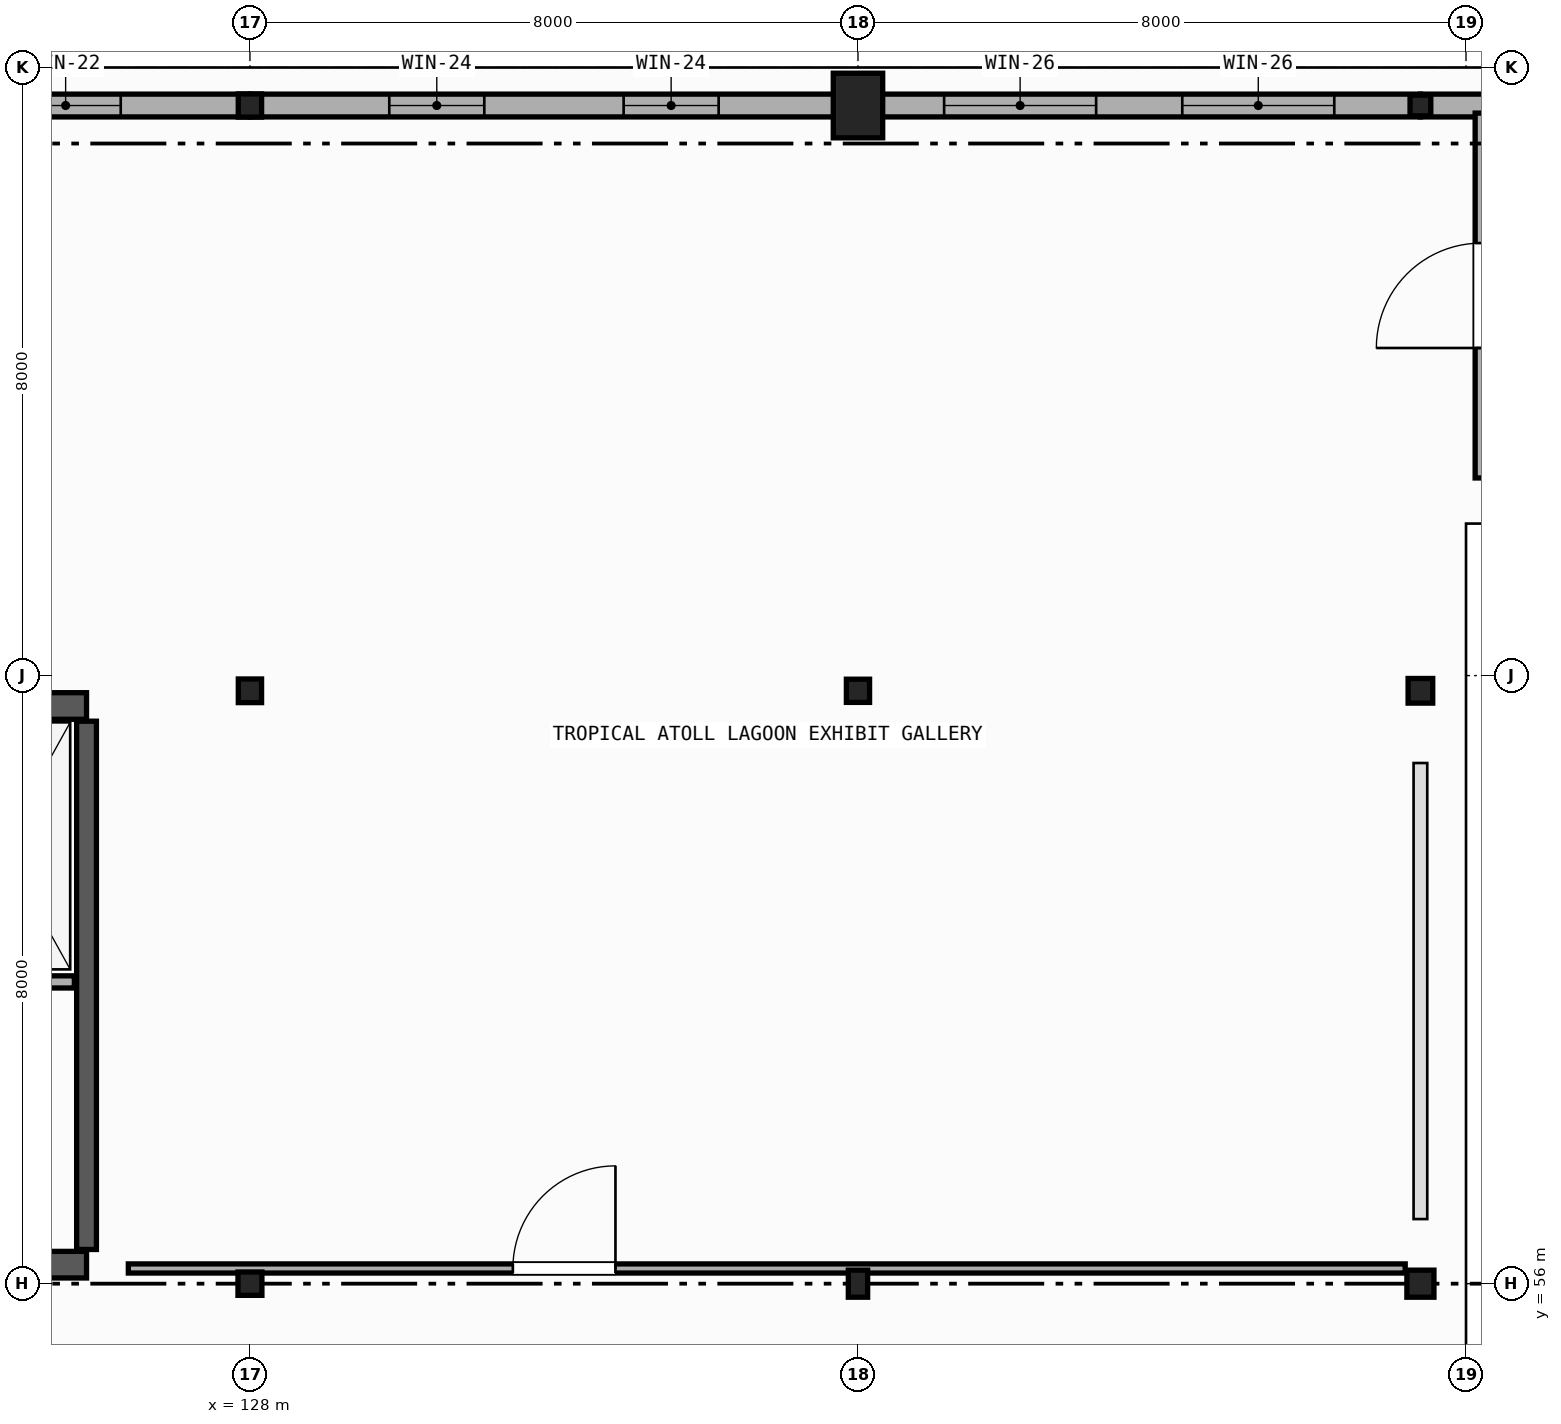
"""IFC4 building model, lengths in metres.
Left out: names, types, materials, properties, quantities, classifications, styles, units other than length and angle.
Written with IfcOpenShell. Run it as: python <this file> out.ifc"""

import sys

from ifc_helpers import new_model, si_unit, direction, frame, frame_2d, origin, origin_2d, place, context, subcontext, project, spatial, rectangle, hollow_rectangle, hollow_circle, i_section, extrude, element, fill, save


model = new_model("IFC4")
c1 = context("Model", 3, precision=1e-05, world=origin(), true_north=direction((0.0, 1.0)))
c2 = subcontext(c1, "Body", "Model", "MODEL_VIEW")
j1 = project(units=[si_unit("LENGTHUNIT", "METRE"), si_unit("PLANEANGLEUNIT", "RADIAN")], contexts=[c1])
p1 = place(None, origin())
s1 = spatial("IfcSite", under=j1, at=p1, CompositionType="ELEMENT")
p2 = place(p1, origin())
s2 = spatial("IfcBuilding", under=s1, at=p2, CompositionType="ELEMENT")
p3 = place(p2, origin())
s3 = spatial("IfcBuildingStorey", under=s2, at=p3, CompositionType="ELEMENT", Elevation=0.0)
p4 = place(p3, frame((128.0, 56.0, 0.0), z_axis=(0.0, 0.0, 1.0), x_axis=(0.0, 1.0, 0.0)))
e1 = element("IfcColumn", 1, at=p4, inside=s3, PredefinedType="COLUMN", context=c2, shape_type="SweptSolid", body=[
    extrude(i_section(OverallWidth=0.307, OverallDepth=0.315, WebThickness=0.012, FlangeThickness=0.019, FilletRadius=0.013, at=origin_2d()), origin(), (0.0, 0.0, 1.0), 5.12),
])
p5 = place(p3, frame((128.0, 63.8, 0.0), z_axis=(0.0, 0.0, 1.0), x_axis=(1.0, 0.0, 0.0)))
e2 = element("IfcColumn", 2, at=p5, inside=s3, PredefinedType="COLUMN", context=c2, shape_type="SweptSolid", body=[
    extrude(i_section(OverallWidth=0.306, OverallDepth=0.311, WebThickness=0.011, FlangeThickness=0.017, FilletRadius=0.013, at=origin_2d()), origin(), (0.0, 0.0, 1.0), 5.12),
])
p6 = place(p3, frame((128.0, 71.5, 0.0), z_axis=(0.0, 0.0, 1.0), x_axis=(0.0, 1.0, 0.0)))
e3 = element("IfcColumn", 3, at=p6, inside=s3, PredefinedType="COLUMN", context=c2, shape_type="SweptSolid", body=[
    extrude(i_section(OverallWidth=0.305, OverallDepth=0.307, WebThickness=0.01, FlangeThickness=0.015, FilletRadius=0.013, at=origin_2d()), origin(), (0.0, 0.0, 1.0), 5.12),
])
p7 = place(p3, frame((136.0, 56.0, 0.0), z_axis=(0.0, 0.0, 1.0), x_axis=(1.0, 0.0, 0.0)))
e4 = element("IfcColumn", 4, at=p7, inside=s3, PredefinedType="COLUMN", context=c2, shape_type="SweptSolid", body=[
    extrude(hollow_rectangle(XDim=0.254, YDim=0.356, WallThickness=0.012, InnerFilletRadius=0.012, OuterFilletRadius=0.024, at=origin_2d()), origin(), (0.0, 0.0, 1.0), 5.12),
])
p8 = place(p3, frame((136.0, 63.8, 0.0), z_axis=(0.0, 0.0, 1.0), x_axis=(0.0, 1.0, 0.0)))
e5 = element("IfcColumn", 5, at=p8, inside=s3, PredefinedType="COLUMN", context=c2, shape_type="SweptSolid", body=[
    extrude(hollow_rectangle(XDim=0.305, YDim=0.305, WallThickness=0.012, InnerFilletRadius=0.012, OuterFilletRadius=0.024, at=origin_2d()), origin(), (0.0, 0.0, 1.0), 5.12),
])
p9 = place(p3, frame((136.0, 71.5, 0.0), z_axis=(0.0, 0.0, 1.0), x_axis=(1.0, 0.0, 0.0)))
e6 = element("IfcColumn", 6, at=p9, inside=s3, PredefinedType="PILASTER", context=c2, shape_type="SweptSolid", body=[
    extrude(rectangle(XDim=0.65, YDim=0.85, at=origin_2d()), origin(), (0.0, 0.0, 1.0), 5.12),
])
p10 = place(p3, frame((143.4, 56.0, 0.0), z_axis=(0.0, 0.0, 1.0), x_axis=(0.0, 1.0, 0.0)))
e7 = element("IfcColumn", 7, at=p10, inside=s3, PredefinedType="COLUMN", context=c2, shape_type="SweptSolid", body=[
    extrude(hollow_circle(Radius=0.178, WallThickness=0.012, at=origin_2d()), origin(), (0.0, 0.0, 1.0), 5.12),
])
p11 = place(p3, frame((143.4, 63.8, 0.0), z_axis=(0.0, 0.0, 1.0), x_axis=(1.0, 0.0, 0.0)))
e8 = element("IfcColumn", 8, at=p11, inside=s3, PredefinedType="COLUMN", context=c2, shape_type="SweptSolid", body=[
    extrude(hollow_circle(Radius=0.162, WallThickness=0.012, at=origin_2d()), origin(), (0.0, 0.0, 1.0), 5.12),
])
p12 = place(p3, frame((143.4, 71.5, 0.0), z_axis=(0.0, 0.0, 1.0), x_axis=(0.0, 1.0, 0.0)))
e9 = element("IfcColumn", 9, at=p12, inside=s3, PredefinedType="COLUMN", context=c2, shape_type="SweptSolid", body=[
    extrude(hollow_circle(Radius=0.136, WallThickness=0.012, at=origin_2d()), origin(), (0.0, 0.0, 1.0), 5.12),
])
p13 = place(p3, frame((120.0, 71.5, 0.0), z_axis=(0.0, 0.0, 1.0), x_axis=(1.0, 0.0, 0.0)))
e10 = element("IfcWall", 10, at=p13, inside=s3, PredefinedType="STANDARD", context=c2, shape_type="SweptSolid", body=[
    extrude(rectangle(XDim=8.0, YDim=0.3, at=frame_2d((4.0, 0.0))), origin(), (0.0, 0.0, 1.0), 4.28),
])
p14 = place(p13, frame((1.7, 0.0, 0.95)))
e11 = element("IfcOpeningElement", 11, at=p14, cuts=e10, PredefinedType="OPENING", context=c2, shape_type="SweptSolid", body=[
    extrude(rectangle(XDim=1.45, YDim=2.05, at=frame_2d((0.725, 1.025))), frame((0.0, 0.16, 0.0), z_axis=(0.0, -1.0, 0.0), x_axis=(1.0, 0.0, 0.0)), (0.0, 0.0, 1.0), 0.32),
])
p15 = place(p13, frame((4.85, 0.0, 0.95)))
e12 = element("IfcOpeningElement", 12, at=p15, cuts=e10, PredefinedType="OPENING", context=c2, shape_type="SweptSolid", body=[
    extrude(rectangle(XDim=1.45, YDim=2.05, at=frame_2d((0.725, 1.025))), frame((0.0, 0.16, 0.0), z_axis=(0.0, -1.0, 0.0), x_axis=(1.0, 0.0, 0.0)), (0.0, 0.0, 1.0), 0.32),
])
p16 = place(p3, frame((128.0, 71.5, 0.0), z_axis=(0.0, 0.0, 1.0), x_axis=(1.0, 0.0, 0.0)))
e13 = element("IfcWall", 13, at=p16, inside=s3, PredefinedType="STANDARD", context=c2, shape_type="SweptSolid", body=[
    extrude(rectangle(XDim=8.0, YDim=0.3, at=frame_2d((4.0, 0.0))), origin(), (0.0, 0.0, 1.0), 4.28),
])
p17 = place(p16, frame((1.833, 0.0, 1.0)))
e14 = element("IfcOpeningElement", 14, at=p17, cuts=e13, PredefinedType="OPENING", context=c2, shape_type="SweptSolid", body=[
    extrude(rectangle(XDim=1.25, YDim=1.85, at=frame_2d((0.625, 0.925))), frame((0.0, 0.16, 0.0), z_axis=(0.0, -1.0, 0.0), x_axis=(1.0, 0.0, 0.0)), (0.0, 0.0, 1.0), 0.32),
])
p18 = place(p16, frame((4.917, 0.0, 1.0)))
e15 = element("IfcOpeningElement", 15, at=p18, cuts=e13, PredefinedType="OPENING", context=c2, shape_type="SweptSolid", body=[
    extrude(rectangle(XDim=1.25, YDim=1.85, at=frame_2d((0.625, 0.925))), frame((0.0, 0.16, 0.0), z_axis=(0.0, -1.0, 0.0), x_axis=(1.0, 0.0, 0.0)), (0.0, 0.0, 1.0), 0.32),
])
p19 = place(p3, frame((136.0, 71.5, 0.0), z_axis=(0.0, 0.0, 1.0), x_axis=(1.0, 0.0, 0.0)))
e16 = element("IfcWall", 16, at=p19, inside=s3, PredefinedType="STANDARD", context=c2, shape_type="SweptSolid", body=[
    extrude(rectangle(XDim=7.4, YDim=0.3, at=frame_2d((3.7, 0.0))), origin(), (0.0, 0.0, 1.0), 4.28),
])
p20 = place(p19, frame((1.133, 0.0, 1.05)))
e17 = element("IfcOpeningElement", 17, at=p20, cuts=e16, PredefinedType="OPENING", context=c2, shape_type="SweptSolid", body=[
    extrude(rectangle(XDim=2.0, YDim=1.85, at=frame_2d((1.0, 0.925))), frame((0.0, 0.16, 0.0), z_axis=(0.0, -1.0, 0.0), x_axis=(1.0, 0.0, 0.0)), (0.0, 0.0, 1.0), 0.32),
])
p21 = place(p19, frame((4.267, 0.0, 1.05)))
e18 = element("IfcOpeningElement", 18, at=p21, cuts=e16, PredefinedType="OPENING", context=c2, shape_type="SweptSolid", body=[
    extrude(rectangle(XDim=2.0, YDim=1.85, at=frame_2d((1.0, 0.925))), frame((0.0, 0.16, 0.0), z_axis=(0.0, -1.0, 0.0), x_axis=(1.0, 0.0, 0.0)), (0.0, 0.0, 1.0), 0.32),
])
p22 = place(p3, frame((143.4, 71.5, 0.0), z_axis=(0.0, 0.0, 1.0), x_axis=(1.0, 0.0, 0.0)))
e19 = element("IfcWall", 19, at=p22, inside=s3, PredefinedType="STANDARD", context=c2, shape_type="SweptSolid", body=[
    extrude(rectangle(XDim=8.6, YDim=0.3, at=frame_2d((4.3, 0.0))), origin(), (0.0, 0.0, 1.0), 4.402),
])
p23 = place(p22, frame((3.3, 0.0, 0.0)))
e20 = element("IfcOpeningElement", 20, at=p23, cuts=e19, PredefinedType="OPENING", context=c2, shape_type="SweptSolid", body=[
    extrude(rectangle(XDim=2.0, YDim=2.5, at=frame_2d((1.0, 1.25))), frame((0.0, 0.16, 0.0), z_axis=(0.0, -1.0, 0.0), x_axis=(1.0, 0.0, 0.0)), (0.0, 0.0, 1.0), 0.32),
])
p24 = place(p3, frame((120.0, 56.25, 0.0), z_axis=(0.0, 0.0, 1.0), x_axis=(1.0, 0.0, 0.0)))
e21 = element("IfcWall", 21, at=p24, inside=s3, PredefinedType="SHEAR", context=c2, shape_type="SweptSolid", body=[
    extrude(rectangle(XDim=5.85, YDim=0.35, at=frame_2d((2.925, 0.0))), origin(), (0.0, 0.0, 1.0), 5.11),
])
p25 = place(p24, frame((1.4, 0.0, 0.0)))
e22 = element("IfcOpeningElement", 22, at=p25, cuts=e21, PredefinedType="OPENING", context=c2, shape_type="SweptSolid", body=[
    extrude(rectangle(XDim=1.05, YDim=2.1, at=frame_2d((0.525, 1.05))), frame((0.0, 0.185, 0.0), z_axis=(0.0, -1.0, 0.0), x_axis=(1.0, 0.0, 0.0)), (0.0, 0.0, 1.0), 0.37),
])
p26 = place(p24, frame((4.25, 0.0, 0.0)))
e23 = element("IfcOpeningElement", 23, at=p26, cuts=e21, PredefinedType="OPENING", context=c2, shape_type="SweptSolid", body=[
    extrude(rectangle(XDim=1.0, YDim=2.15, at=frame_2d((0.5, 1.075))), frame((0.0, 0.185, 0.0), z_axis=(0.0, -1.0, 0.0), x_axis=(1.0, 0.0, 0.0)), (0.0, 0.0, 1.0), 0.37),
])
p27 = place(p3, frame((120.0, 63.6, 0.0), z_axis=(0.0, 0.0, 1.0), x_axis=(1.0, 0.0, 0.0)))
e24 = element("IfcWall", 24, at=p27, inside=s3, PredefinedType="SHEAR", context=c2, shape_type="SweptSolid", body=[
    extrude(rectangle(XDim=5.85, YDim=0.35, at=frame_2d((2.925, 0.0))), origin(), (0.0, 0.0, 1.0), 5.11),
])
p28 = place(p3, frame((125.85, 56.45, 0.0), z_axis=(0.0, 0.0, 1.0), x_axis=(0.0, 1.0, 0.0)))
e25 = element("IfcWall", 25, at=p28, inside=s3, PredefinedType="SHEAR", context=c2, shape_type="SweptSolid", body=[
    extrude(rectangle(XDim=6.95, YDim=0.26, at=frame_2d((3.475, 0.0))), origin(), (0.0, 0.0, 1.0), 5.11),
])
p29 = place(p3, frame((123.85, 59.97, 0.0), z_axis=(0.0, 0.0, 1.0), x_axis=(1.0, 0.0, 0.0)))
e26 = element("IfcWall", 26, at=p29, inside=s3, PredefinedType="PARTITIONING", context=c2, shape_type="SweptSolid", body=[
    extrude(rectangle(XDim=1.84, YDim=0.16, at=frame_2d((0.92, 0.0))), origin(), (0.0, 0.0, 1.0), 3.6),
])
p30 = place(p29, frame((0.37, 0.0, 0.0)))
e27 = element("IfcOpeningElement", 27, at=p30, cuts=e26, PredefinedType="OPENING", context=c2, shape_type="SweptSolid", body=[
    extrude(rectangle(XDim=1.1, YDim=2.15, at=frame_2d((0.55, 1.075))), frame((0.0, 0.09, 0.0), z_axis=(0.0, -1.0, 0.0), x_axis=(1.0, 0.0, 0.0)), (0.0, 0.0, 1.0), 0.18),
])
p31 = place(p3, frame((126.4, 56.2, 0.0), z_axis=(0.0, 0.0, 1.0), x_axis=(1.0, 0.0, 0.0)))
e28 = element("IfcWall", 28, at=p31, inside=s3, PredefinedType="PARTITIONING", context=c2, shape_type="SweptSolid", body=[
    extrude(rectangle(XDim=16.8, YDim=0.12, at=frame_2d((8.4, 0.0))), origin(), (0.0, 0.0, 1.0), 4.29),
])
p32 = place(p31, frame((5.059, 0.0, 0.0)))
e29 = element("IfcOpeningElement", 29, at=p32, cuts=e28, PredefinedType="OPENING", context=c2, shape_type="SweptSolid", body=[
    extrude(rectangle(XDim=1.35, YDim=2.25, at=frame_2d((0.675, 1.125))), frame((0.0, 0.07, 0.0), z_axis=(0.0, -1.0, 0.0), x_axis=(1.0, 0.0, 0.0)), (0.0, 0.0, 1.0), 0.14),
])
p33 = place(p3, frame((144.2, 66.6, 0.0), z_axis=(0.0, 0.0, 1.0), x_axis=(0.0, 1.0, 0.0)))
e30 = element("IfcWall", 30, at=p33, inside=s3, PredefinedType="PARTITIONING", context=c2, shape_type="SweptSolid", body=[
    extrude(rectangle(XDim=4.8, YDim=0.16, at=frame_2d((2.4, 0.0))), origin(), (0.0, 0.0, 1.0), 4.29),
])
p34 = place(p33, frame((1.71, 0.0, 0.0)))
e31 = element("IfcOpeningElement", 31, at=p34, cuts=e30, PredefinedType="OPENING", context=c2, shape_type="SweptSolid", body=[
    extrude(rectangle(XDim=1.38, YDim=2.25, at=frame_2d((0.69, 1.125))), frame((0.0, 0.09, 0.0), z_axis=(0.0, -1.0, 0.0), x_axis=(1.0, 0.0, 0.0)), (0.0, 0.0, 1.0), 0.18),
])
p35 = place(p15, origin())
e32 = element("IfcWindow", 32, at=p35, inside=s3, PartitioningType="SINGLE_PANEL", PredefinedType="WINDOW", context=c2, shape_type="SweptSolid", body=[
    extrude(rectangle(XDim=1.45, YDim=2.05, at=frame_2d((0.725, 1.025))), frame((0.0, 0.03, 0.0), z_axis=(0.0, -1.0, 0.0), x_axis=(1.0, 0.0, 0.0)), (0.0, 0.0, 1.0), 0.06),
])
fill(e12, e32)
p36 = place(p17, origin())
e33 = element("IfcWindow", 33, at=p36, inside=s3, PartitioningType="SINGLE_PANEL", PredefinedType="WINDOW", context=c2, shape_type="SweptSolid", body=[
    extrude(rectangle(XDim=1.25, YDim=1.85, at=frame_2d((0.625, 0.925))), frame((0.0, 0.03, 0.0), z_axis=(0.0, -1.0, 0.0), x_axis=(1.0, 0.0, 0.0)), (0.0, 0.0, 1.0), 0.06),
])
fill(e14, e33)
p37 = place(p18, origin())
e34 = element("IfcWindow", 34, at=p37, inside=s3, PartitioningType="SINGLE_PANEL", PredefinedType="WINDOW", context=c2, shape_type="SweptSolid", body=[
    extrude(rectangle(XDim=1.25, YDim=1.85, at=frame_2d((0.625, 0.925))), frame((0.0, 0.03, 0.0), z_axis=(0.0, -1.0, 0.0), x_axis=(1.0, 0.0, 0.0)), (0.0, 0.0, 1.0), 0.06),
])
fill(e15, e34)
p38 = place(p20, origin())
e35 = element("IfcWindow", 35, at=p38, inside=s3, PartitioningType="SINGLE_PANEL", PredefinedType="WINDOW", context=c2, shape_type="SweptSolid", body=[
    extrude(rectangle(XDim=2.0, YDim=1.85, at=frame_2d((1.0, 0.925))), frame((0.0, 0.03, 0.0), z_axis=(0.0, -1.0, 0.0), x_axis=(1.0, 0.0, 0.0)), (0.0, 0.0, 1.0), 0.06),
])
fill(e17, e35)
p39 = place(p21, origin())
e36 = element("IfcWindow", 36, at=p39, inside=s3, PartitioningType="SINGLE_PANEL", PredefinedType="WINDOW", context=c2, shape_type="SweptSolid", body=[
    extrude(rectangle(XDim=2.0, YDim=1.85, at=frame_2d((1.0, 0.925))), frame((0.0, 0.03, 0.0), z_axis=(0.0, -1.0, 0.0), x_axis=(1.0, 0.0, 0.0)), (0.0, 0.0, 1.0), 0.06),
])
fill(e18, e36)
p40 = place(p32, origin())
e37 = element("IfcDoor", 37, at=p40, inside=s3, OperationType="SINGLE_SWING_RIGHT", PredefinedType="DOOR", context=c2, shape_type="SweptSolid", body=[
    extrude(rectangle(XDim=1.35, YDim=2.25, at=frame_2d((0.675, 1.125))), frame((0.0, 0.025, 0.0), z_axis=(0.0, -1.0, 0.0), x_axis=(1.0, 0.0, 0.0)), (0.0, 0.0, 1.0), 0.05),
])
fill(e29, e37)
p41 = place(p34, origin())
e38 = element("IfcDoor", 38, at=p41, inside=s3, OperationType="SINGLE_SWING_LEFT", PredefinedType="DOOR", context=c2, shape_type="SweptSolid", body=[
    extrude(rectangle(XDim=1.38, YDim=2.25, at=frame_2d((0.69, 1.125))), frame((0.0, 0.025, 0.0), z_axis=(0.0, -1.0, 0.0), x_axis=(1.0, 0.0, 0.0)), (0.0, 0.0, 1.0), 0.05),
])
fill(e31, e38)
save(model, sys.argv[1])
